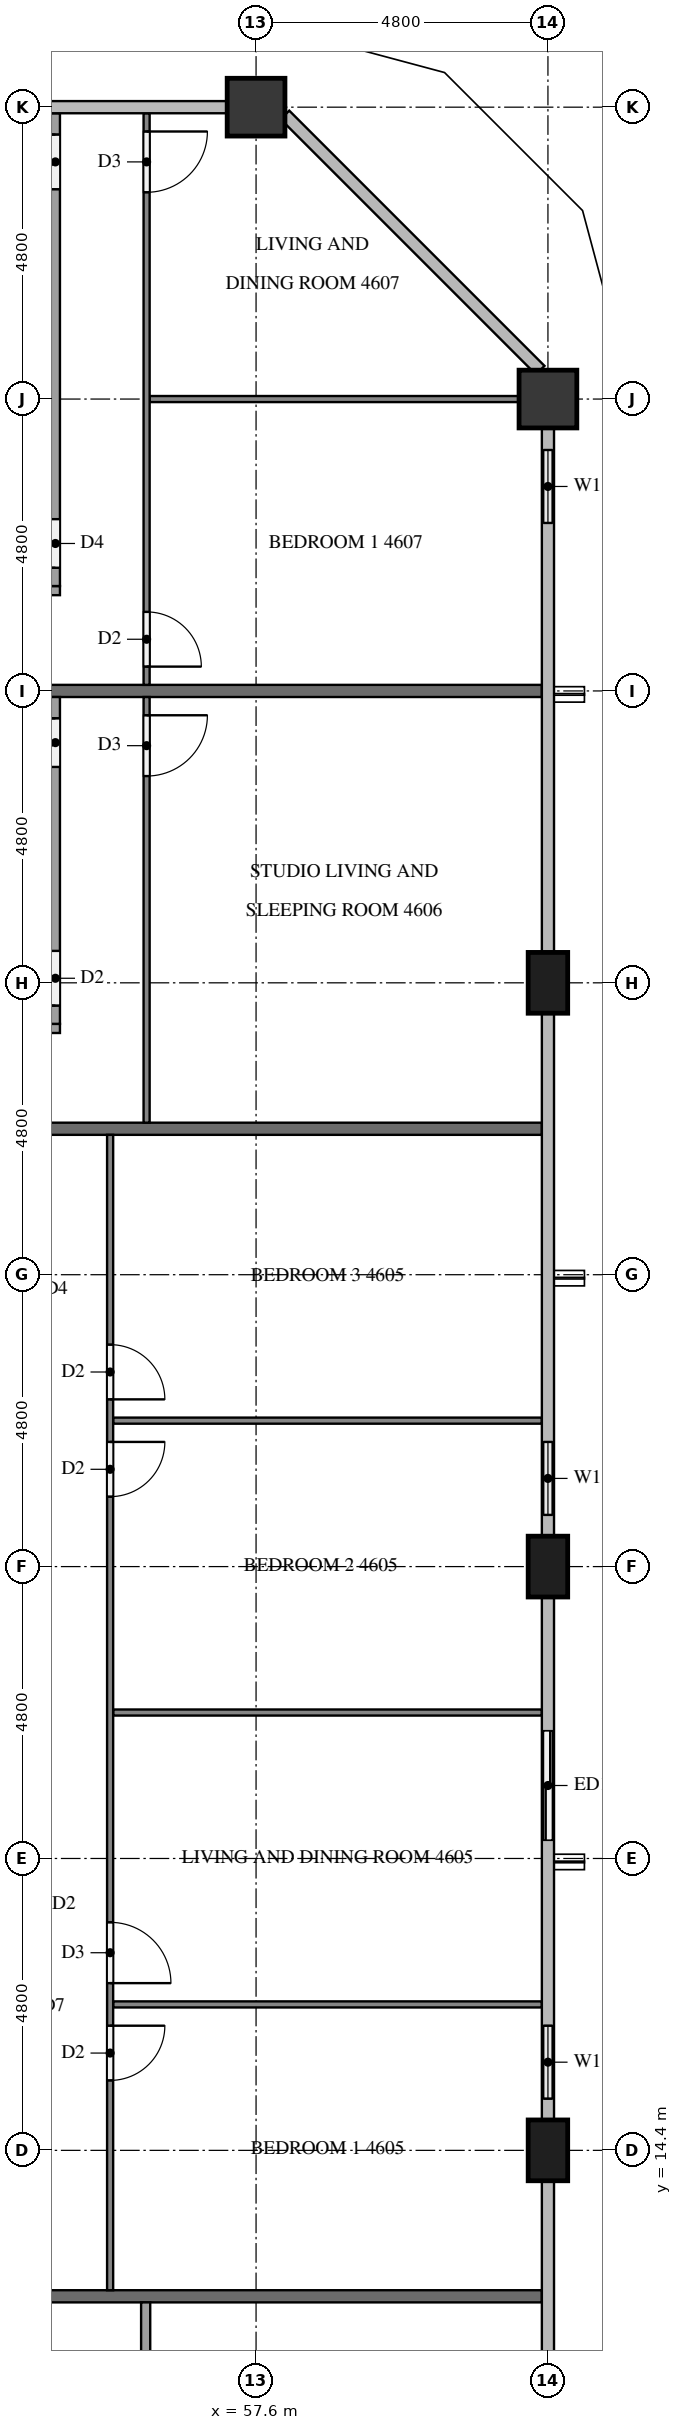
"""IFC4 building model, lengths in metres.
Left out: names, types, materials, properties, quantities, classifications, styles, units other than length and angle.
Written with IfcOpenShell. Run it as: python <this file> out.ifc"""

import sys

from ifc_helpers import new_model, si_unit, direction, frame, frame_2d, origin, origin_2d, place, context, subcontext, project, spatial, rectangle, extrude, element, fill, save


model = new_model("IFC4")
c1 = context("Model", 3, precision=1e-05, world=origin(), true_north=direction((0.0, 1.0)))
c2 = subcontext(c1, "Body", "Model", "MODEL_VIEW")
j1 = project(units=[si_unit("LENGTHUNIT", "METRE"), si_unit("PLANEANGLEUNIT", "RADIAN")], contexts=[c1])
p1 = place(None, origin())
s1 = spatial("IfcSite", under=j1, at=p1, CompositionType="ELEMENT")
p2 = place(p1, origin())
s2 = spatial("IfcBuilding", under=s1, at=p2, CompositionType="ELEMENT")
p3 = place(p2, frame((0.0, 0.0, 178.9)))
s3 = spatial("IfcBuildingStorey", under=s2, at=p3, CompositionType="ELEMENT", Elevation=178.9)
for number, where, z_axis, x_axis in (
    (1, (62.4, 14.4, 0.0), (0.0, 0.0, 1.0), (0.0, 1.0, 0.0)),
    (2, (62.4, 24.0, 0.0), (0.0, 0.0, 1.0), (0.0, 1.0, 0.0)),
    (3, (62.4, 33.6, 0.0), (0.0, 0.0, 1.0), (0.0, 1.0, 0.0)),
):
    element("IfcColumn", number, at=place(p3, frame(where, z_axis=z_axis, x_axis=x_axis)), inside=s3, PredefinedType="COLUMN", context=c2, shape_type="SweptSolid", body=[
        extrude(rectangle(XDim=1.0, YDim=0.65, at=origin_2d()), origin(), (0.0, 0.0, 1.0), 3.2),
    ])
for number, where, z_axis, x_axis in (
    (4, (62.4, 43.2, 0.0), (0.0, 0.0, 1.0), (1.0, 0.0, 0.0)),
    (5, (57.6, 48.0, 0.0), (0.0, 0.0, 1.0), (1.0, 0.0, 0.0)),
):
    element("IfcColumn", number, at=place(p3, frame(where, z_axis=z_axis, x_axis=x_axis)), inside=s3, PredefinedType="COLUMN", context=c2, shape_type="SweptSolid", body=[
        extrude(rectangle(XDim=0.95, YDim=0.95, at=origin_2d()), origin(), (0.0, 0.0, 1.0), 3.2),
    ])
p4 = place(p3, frame((62.4, 14.9, 0.0), z_axis=(0.0, 0.0, 1.0), x_axis=(0.0, 1.0, 0.0)))
e6 = element("IfcWall", 6, at=p4, inside=s3, PredefinedType="SOLIDWALL", context=c2, shape_type="SweptSolid", body=[
    extrude(rectangle(XDim=1.9, YDim=0.15, at=frame_2d((0.95, 0.0))), origin(), (0.0, 0.0, 1.0), 3.2),
])
p5 = place(p4, frame((0.35, 0.0, 0.9)))
e7 = element("IfcOpeningElement", 7, at=p5, cuts=e6, PredefinedType="OPENING", context=c2, shape_type="SweptSolid", body=[
    extrude(rectangle(XDim=1.2, YDim=1.4, at=frame_2d((0.6, 0.7))), frame((0.0, 0.085, 0.0), z_axis=(0.0, -1.0, 0.0), x_axis=(1.0, 0.0, 0.0)), (0.0, 0.0, 1.0), 0.17),
])
p6 = place(p3, frame((62.4, 19.2, 0.0), z_axis=(0.0, 0.0, 1.0), x_axis=(0.0, 1.0, 0.0)))
e8 = element("IfcWall", 8, at=p6, inside=s3, PredefinedType="SOLIDWALL", context=c2, shape_type="SweptSolid", body=[
    extrude(rectangle(XDim=2.4, YDim=0.15, at=frame_2d((1.2, 0.0))), origin(), (0.0, 0.0, 1.0), 3.2),
])
p7 = place(p6, frame((0.3, 0.0, 0.0)))
e9 = element("IfcOpeningElement", 9, at=p7, cuts=e8, PredefinedType="OPENING", context=c2, shape_type="SweptSolid", body=[
    extrude(rectangle(XDim=1.8, YDim=2.4, at=frame_2d((0.9, 1.2))), frame((0.0, 0.085, 0.0), z_axis=(0.0, -1.0, 0.0), x_axis=(1.0, 0.0, 0.0)), (0.0, 0.0, 1.0), 0.17),
])
p8 = place(p3, frame((62.4, 24.5, 0.0), z_axis=(0.0, 0.0, 1.0), x_axis=(0.0, 1.0, 0.0)))
e10 = element("IfcWall", 10, at=p8, inside=s3, PredefinedType="SOLIDWALL", context=c2, shape_type="SweptSolid", body=[
    extrude(rectangle(XDim=1.9, YDim=0.15, at=frame_2d((0.95, 0.0))), origin(), (0.0, 0.0, 1.0), 3.2),
])
p9 = place(p8, frame((0.35, 0.0, 0.9)))
e11 = element("IfcOpeningElement", 11, at=p9, cuts=e10, PredefinedType="OPENING", context=c2, shape_type="SweptSolid", body=[
    extrude(rectangle(XDim=1.2, YDim=1.4, at=frame_2d((0.6, 0.7))), frame((0.0, 0.085, 0.0), z_axis=(0.0, -1.0, 0.0), x_axis=(1.0, 0.0, 0.0)), (0.0, 0.0, 1.0), 0.17),
])
p10 = place(p3, frame((62.4, 40.8, 0.0), z_axis=(0.0, 0.0, 1.0), x_axis=(0.0, 1.0, 0.0)))
e12 = element("IfcWall", 12, at=p10, inside=s3, PredefinedType="SOLIDWALL", context=c2, shape_type="SweptSolid", body=[
    extrude(rectangle(XDim=1.925, YDim=0.15, at=frame_2d((0.962, 0.0))), origin(), (0.0, 0.0, 1.0), 3.2),
])
p11 = place(p10, frame((0.363, 0.0, 0.9)))
e13 = element("IfcOpeningElement", 13, at=p11, cuts=e12, PredefinedType="OPENING", context=c2, shape_type="SweptSolid", body=[
    extrude(rectangle(XDim=1.2, YDim=1.4, at=frame_2d((0.6, 0.7))), frame((0.0, 0.085, 0.0), z_axis=(0.0, -1.0, 0.0), x_axis=(1.0, 0.0, 0.0)), (0.0, 0.0, 1.0), 0.17),
])
for number, where, z_axis, x_axis in (
    (14, (50.5, 12.0, 0.0), (0.0, 0.0, 1.0), (1.0, 0.0, 0.0)),
    (15, (50.5, 31.2, 0.0), (0.0, 0.0, 1.0), (1.0, 0.0, 0.0)),
    (16, (50.5, 38.4, 0.0), (0.0, 0.0, 1.0), (1.0, 0.0, 0.0)),
):
    element("IfcWall", number, at=place(p3, frame(where, z_axis=z_axis, x_axis=x_axis)), inside=s3, PredefinedType="PARTITIONING", context=c2, shape_type="SweptSolid", body=[
        extrude(rectangle(XDim=11.8, YDim=0.2, at=frame_2d((5.9, 0.0))), origin(), (0.0, 0.0, 1.0), 3.2),
    ])
p12 = place(p3, frame((55.784, 11.9, 0.0), z_axis=(0.0, 0.0, 1.0), x_axis=(0.0, -1.0, 0.0)))
e17 = element("IfcWall", 17, at=p12, inside=s3, PredefinedType="PARTITIONING", context=c2, shape_type="SweptSolid", body=[
    extrude(rectangle(XDim=4.325, YDim=0.15, at=frame_2d((2.163, 0.0))), origin(), (0.0, 0.0, 1.0), 3.2),
])
for number, where, z_axis, x_axis in (
    (18, (55.25, 16.8, 0.0), (0.0, 0.0, 1.0), (1.0, 0.0, 0.0)),
    (19, (55.25, 21.6, 0.0), (0.0, 0.0, 1.0), (1.0, 0.0, 0.0)),
    (20, (55.25, 26.4, 0.0), (0.0, 0.0, 1.0), (1.0, 0.0, 0.0)),
):
    element("IfcWall", number, at=place(p3, frame(where, z_axis=z_axis, x_axis=x_axis)), inside=s3, PredefinedType="PARTITIONING", context=c2, shape_type="SweptSolid", body=[
        extrude(rectangle(XDim=7.05, YDim=0.1, at=frame_2d((3.525, 0.0))), origin(), (0.0, 0.0, 1.0), 3.2),
    ])
p13 = place(p3, frame((55.2, 31.1, 0.0), z_axis=(0.0, 0.0, 1.0), x_axis=(0.0, -1.0, 0.0)))
e21 = element("IfcWall", 21, at=p13, inside=s3, PredefinedType="PARTITIONING", context=c2, shape_type="SweptSolid", body=[
    extrude(rectangle(XDim=19.0, YDim=0.1, at=frame_2d((9.5, 0.0))), origin(), (0.0, 0.0, 1.0), 3.2),
])
p14 = place(p13, frame((14.65, 0.0, 0.0)))
e22 = element("IfcOpeningElement", 22, at=p14, cuts=e21, PredefinedType="OPENING", context=c2, shape_type="SweptSolid", body=[
    extrude(rectangle(XDim=0.9, YDim=2.1, at=frame_2d((0.45, 1.05))), frame((0.0, 0.06, 0.0), z_axis=(0.0, -1.0, 0.0), x_axis=(1.0, 0.0, 0.0)), (0.0, 0.0, 1.0), 0.12),
])
p15 = place(p13, frame((12.95, 0.0, 0.0)))
e23 = element("IfcOpeningElement", 23, at=p15, cuts=e21, PredefinedType="OPENING", context=c2, shape_type="SweptSolid", body=[
    extrude(rectangle(XDim=1.0, YDim=2.1, at=frame_2d((0.5, 1.05))), frame((0.0, 0.06, 0.0), z_axis=(0.0, -1.0, 0.0), x_axis=(1.0, 0.0, 0.0)), (0.0, 0.0, 1.0), 0.12),
])
p16 = place(p13, frame((5.05, 0.0, 0.0)))
e24 = element("IfcOpeningElement", 24, at=p16, cuts=e21, PredefinedType="OPENING", context=c2, shape_type="SweptSolid", body=[
    extrude(rectangle(XDim=0.9, YDim=2.1, at=frame_2d((0.45, 1.05))), frame((0.0, 0.06, 0.0), z_axis=(0.0, -1.0, 0.0), x_axis=(1.0, 0.0, 0.0)), (0.0, 0.0, 1.0), 0.12),
])
p17 = place(p13, frame((3.45, 0.0, 0.0)))
e25 = element("IfcOpeningElement", 25, at=p17, cuts=e21, PredefinedType="OPENING", context=c2, shape_type="SweptSolid", body=[
    extrude(rectangle(XDim=0.9, YDim=2.1, at=frame_2d((0.45, 1.05))), frame((0.0, 0.06, 0.0), z_axis=(0.0, -1.0, 0.0), x_axis=(1.0, 0.0, 0.0)), (0.0, 0.0, 1.0), 0.12),
])
p18 = place(p3, frame((55.8, 38.3, 0.0), z_axis=(0.0, 0.0, 1.0), x_axis=(0.0, -1.0, 0.0)))
e26 = element("IfcWall", 26, at=p18, inside=s3, PredefinedType="PARTITIONING", context=c2, shape_type="SweptSolid", body=[
    extrude(rectangle(XDim=7.0, YDim=0.1, at=frame_2d((3.5, 0.0))), origin(), (0.0, 0.0, 1.0), 3.2),
])
p19 = place(p18, frame((0.3, 0.0, 0.0)))
e27 = element("IfcOpeningElement", 27, at=p19, cuts=e26, PredefinedType="OPENING", context=c2, shape_type="SweptSolid", body=[
    extrude(rectangle(XDim=1.0, YDim=2.1, at=frame_2d((0.5, 1.05))), frame((0.0, 0.06, 0.0), z_axis=(0.0, -1.0, 0.0), x_axis=(1.0, 0.0, 0.0)), (0.0, 0.0, 1.0), 0.12),
])
p20 = place(p3, frame((50.5, 32.85, 0.0), z_axis=(0.0, 0.0, 1.0), x_axis=(1.0, 0.0, 0.0)))
e28 = element("IfcWall", 28, at=p20, inside=s3, PredefinedType="PARTITIONING", context=c2, shape_type="SweptSolid", body=[
    extrude(rectangle(XDim=3.875, YDim=0.15, at=frame_2d((1.938, 0.0))), origin(), (0.0, 0.0, 1.0), 3.2),
])
p21 = place(p3, frame((54.3, 32.925, 0.0), z_axis=(0.0, 0.0, 1.0), x_axis=(0.0, 1.0, 0.0)))
e29 = element("IfcWall", 29, at=p21, inside=s3, PredefinedType="PARTITIONING", context=c2, shape_type="SweptSolid", body=[
    extrude(rectangle(XDim=5.375, YDim=0.15, at=frame_2d((2.688, 0.0))), origin(), (0.0, 0.0, 1.0), 3.2),
])
p22 = place(p21, frame((0.3, 0.0, 0.0)))
e30 = element("IfcOpeningElement", 30, at=p22, cuts=e29, PredefinedType="OPENING", context=c2, shape_type="SweptSolid", body=[
    extrude(rectangle(XDim=0.9, YDim=2.1, at=frame_2d((0.45, 1.05))), frame((0.0, 0.085, 0.0), z_axis=(0.0, -1.0, 0.0), x_axis=(1.0, 0.0, 0.0)), (0.0, 0.0, 1.0), 0.17),
])
p23 = place(p21, frame((4.225, 0.0, 0.0)))
e31 = element("IfcOpeningElement", 31, at=p23, cuts=e29, PredefinedType="OPENING", context=c2, shape_type="SweptSolid", body=[
    extrude(rectangle(XDim=0.8, YDim=2.1, at=frame_2d((0.4, 1.05))), frame((0.0, 0.085, 0.0), z_axis=(0.0, -1.0, 0.0), x_axis=(1.0, 0.0, 0.0)), (0.0, 0.0, 1.0), 0.17),
])
p24 = place(p3, frame((55.85, 43.2, 0.0), z_axis=(0.0, 0.0, 1.0), x_axis=(1.0, 0.0, 0.0)))
e32 = element("IfcWall", 32, at=p24, inside=s3, PredefinedType="PARTITIONING", context=c2, shape_type="SweptSolid", body=[
    extrude(rectangle(XDim=6.075, YDim=0.1, at=frame_2d((3.038, 0.0))), origin(), (0.0, 0.0, 1.0), 3.2),
])
p25 = place(p3, frame((55.8, 47.9, 0.0), z_axis=(0.0, 0.0, 1.0), x_axis=(0.0, -1.0, 0.0)))
e33 = element("IfcWall", 33, at=p25, inside=s3, PredefinedType="PARTITIONING", context=c2, shape_type="SweptSolid", body=[
    extrude(rectangle(XDim=9.4, YDim=0.1, at=frame_2d((4.7, 0.0))), origin(), (0.0, 0.0, 1.0), 3.2),
])
p26 = place(p25, frame((8.2, 0.0, 0.0)))
e34 = element("IfcOpeningElement", 34, at=p26, cuts=e33, PredefinedType="OPENING", context=c2, shape_type="SweptSolid", body=[
    extrude(rectangle(XDim=0.9, YDim=2.1, at=frame_2d((0.45, 1.05))), frame((0.0, 0.06, 0.0), z_axis=(0.0, -1.0, 0.0), x_axis=(1.0, 0.0, 0.0)), (0.0, 0.0, 1.0), 0.12),
])
p27 = place(p25, frame((0.3, 0.0, 0.0)))
e35 = element("IfcOpeningElement", 35, at=p27, cuts=e33, PredefinedType="OPENING", context=c2, shape_type="SweptSolid", body=[
    extrude(rectangle(XDim=1.0, YDim=2.1, at=frame_2d((0.5, 1.05))), frame((0.0, 0.06, 0.0), z_axis=(0.0, -1.0, 0.0), x_axis=(1.0, 0.0, 0.0)), (0.0, 0.0, 1.0), 0.12),
])
p28 = place(p3, frame((50.5, 40.05, 0.0), z_axis=(0.0, 0.0, 1.0), x_axis=(1.0, 0.0, 0.0)))
e36 = element("IfcWall", 36, at=p28, inside=s3, PredefinedType="PARTITIONING", context=c2, shape_type="SweptSolid", body=[
    extrude(rectangle(XDim=3.875, YDim=0.15, at=frame_2d((1.938, 0.0))), origin(), (0.0, 0.0, 1.0), 3.2),
])
p29 = place(p3, frame((54.3, 40.125, 0.0), z_axis=(0.0, 0.0, 1.0), x_axis=(0.0, 1.0, 0.0)))
e37 = element("IfcWall", 37, at=p29, inside=s3, PredefinedType="PARTITIONING", context=c2, shape_type="SweptSolid", body=[
    extrude(rectangle(XDim=7.775, YDim=0.15, at=frame_2d((3.887, 0.0))), origin(), (0.0, 0.0, 1.0), 3.2),
])
p30 = place(p29, frame((0.3, 0.0, 0.0)))
e38 = element("IfcOpeningElement", 38, at=p30, cuts=e37, PredefinedType="OPENING", context=c2, shape_type="SweptSolid", body=[
    extrude(rectangle(XDim=0.8, YDim=2.1, at=frame_2d((0.4, 1.05))), frame((0.0, 0.085, 0.0), z_axis=(0.0, -1.0, 0.0), x_axis=(1.0, 0.0, 0.0)), (0.0, 0.0, 1.0), 0.17),
])
p31 = place(p29, frame((6.525, 0.0, 0.0)))
e39 = element("IfcOpeningElement", 39, at=p31, cuts=e37, PredefinedType="OPENING", context=c2, shape_type="SweptSolid", body=[
    extrude(rectangle(XDim=0.9, YDim=2.1, at=frame_2d((0.45, 1.05))), frame((0.0, 0.085, 0.0), z_axis=(0.0, -1.0, 0.0), x_axis=(1.0, 0.0, 0.0)), (0.0, 0.0, 1.0), 0.17),
])
p32 = place(p5, origin())
e40 = element("IfcWindow", 40, at=p32, inside=s3, PartitioningType="SINGLE_PANEL", PredefinedType="WINDOW", context=c2, shape_type="SweptSolid", body=[
    extrude(rectangle(XDim=1.2, YDim=1.4, at=frame_2d((0.6, 0.7))), frame((0.0, 0.03, 0.0), z_axis=(0.0, -1.0, 0.0), x_axis=(1.0, 0.0, 0.0)), (0.0, 0.0, 1.0), 0.06),
])
fill(e7, e40)
p33 = place(p7, origin())
e41 = element("IfcDoor", 41, at=p33, inside=s3, OperationType="SLIDING_TO_RIGHT", PredefinedType="DOOR", context=c2, shape_type="SweptSolid", body=[
    extrude(rectangle(XDim=1.8, YDim=2.4, at=frame_2d((0.9, 1.2))), frame((0.0, 0.025, 0.0), z_axis=(0.0, -1.0, 0.0), x_axis=(1.0, 0.0, 0.0)), (0.0, 0.0, 1.0), 0.05),
])
fill(e9, e41)
p34 = place(p9, origin())
e42 = element("IfcWindow", 42, at=p34, inside=s3, PartitioningType="SINGLE_PANEL", PredefinedType="WINDOW", context=c2, shape_type="SweptSolid", body=[
    extrude(rectangle(XDim=1.2, YDim=1.4, at=frame_2d((0.6, 0.7))), frame((0.0, 0.03, 0.0), z_axis=(0.0, -1.0, 0.0), x_axis=(1.0, 0.0, 0.0)), (0.0, 0.0, 1.0), 0.06),
])
fill(e11, e42)
p35 = place(p11, origin())
e43 = element("IfcWindow", 43, at=p35, inside=s3, PartitioningType="SINGLE_PANEL", PredefinedType="WINDOW", context=c2, shape_type="SweptSolid", body=[
    extrude(rectangle(XDim=1.2, YDim=1.4, at=frame_2d((0.6, 0.7))), frame((0.0, 0.03, 0.0), z_axis=(0.0, -1.0, 0.0), x_axis=(1.0, 0.0, 0.0)), (0.0, 0.0, 1.0), 0.06),
])
fill(e13, e43)
p36 = place(p14, origin())
e44 = element("IfcDoor", 44, at=p36, inside=s3, OperationType="SINGLE_SWING_LEFT", PredefinedType="DOOR", context=c2, shape_type="SweptSolid", body=[
    extrude(rectangle(XDim=0.9, YDim=2.1, at=frame_2d((0.45, 1.05))), frame((0.0, 0.025, 0.0), z_axis=(0.0, -1.0, 0.0), x_axis=(1.0, 0.0, 0.0)), (0.0, 0.0, 1.0), 0.05),
])
fill(e22, e44)
p37 = place(p15, origin())
e45 = element("IfcDoor", 45, at=p37, inside=s3, OperationType="SINGLE_SWING_RIGHT", PredefinedType="DOOR", context=c2, shape_type="SweptSolid", body=[
    extrude(rectangle(XDim=1.0, YDim=2.1, at=frame_2d((0.5, 1.05))), frame((0.0, 0.025, 0.0), z_axis=(0.0, -1.0, 0.0), x_axis=(1.0, 0.0, 0.0)), (0.0, 0.0, 1.0), 0.05),
])
fill(e23, e45)
p38 = place(p16, origin())
e46 = element("IfcDoor", 46, at=p38, inside=s3, OperationType="SINGLE_SWING_LEFT", PredefinedType="DOOR", context=c2, shape_type="SweptSolid", body=[
    extrude(rectangle(XDim=0.9, YDim=2.1, at=frame_2d((0.45, 1.05))), frame((0.0, 0.025, 0.0), z_axis=(0.0, -1.0, 0.0), x_axis=(1.0, 0.0, 0.0)), (0.0, 0.0, 1.0), 0.05),
])
fill(e24, e46)
p39 = place(p17, origin())
e47 = element("IfcDoor", 47, at=p39, inside=s3, OperationType="SINGLE_SWING_RIGHT", PredefinedType="DOOR", context=c2, shape_type="SweptSolid", body=[
    extrude(rectangle(XDim=0.9, YDim=2.1, at=frame_2d((0.45, 1.05))), frame((0.0, 0.025, 0.0), z_axis=(0.0, -1.0, 0.0), x_axis=(1.0, 0.0, 0.0)), (0.0, 0.0, 1.0), 0.05),
])
fill(e25, e47)
p40 = place(p19, origin())
e48 = element("IfcDoor", 48, at=p40, inside=s3, OperationType="SINGLE_SWING_LEFT", PredefinedType="DOOR", context=c2, shape_type="SweptSolid", body=[
    extrude(rectangle(XDim=1.0, YDim=2.1, at=frame_2d((0.5, 1.05))), frame((0.0, 0.025, 0.0), z_axis=(0.0, -1.0, 0.0), x_axis=(1.0, 0.0, 0.0)), (0.0, 0.0, 1.0), 0.05),
])
fill(e27, e48)
p41 = place(p22, origin())
e49 = element("IfcDoor", 49, at=p41, inside=s3, OperationType="SINGLE_SWING_LEFT", PredefinedType="DOOR", context=c2, shape_type="SweptSolid", body=[
    extrude(rectangle(XDim=0.9, YDim=2.1, at=frame_2d((0.45, 1.05))), frame((0.0, 0.025, 0.0), z_axis=(0.0, -1.0, 0.0), x_axis=(1.0, 0.0, 0.0)), (0.0, 0.0, 1.0), 0.05),
])
fill(e30, e49)
p42 = place(p23, origin())
e50 = element("IfcDoor", 50, at=p42, inside=s3, OperationType="SINGLE_SWING_RIGHT", PredefinedType="DOOR", context=c2, shape_type="SweptSolid", body=[
    extrude(rectangle(XDim=0.8, YDim=2.1, at=frame_2d((0.4, 1.05))), frame((0.0, 0.025, 0.0), z_axis=(0.0, -1.0, 0.0), x_axis=(1.0, 0.0, 0.0)), (0.0, 0.0, 1.0), 0.05),
])
fill(e31, e50)
p43 = place(p26, origin())
e51 = element("IfcDoor", 51, at=p43, inside=s3, OperationType="SINGLE_SWING_RIGHT", PredefinedType="DOOR", context=c2, shape_type="SweptSolid", body=[
    extrude(rectangle(XDim=0.9, YDim=2.1, at=frame_2d((0.45, 1.05))), frame((0.0, 0.025, 0.0), z_axis=(0.0, -1.0, 0.0), x_axis=(1.0, 0.0, 0.0)), (0.0, 0.0, 1.0), 0.05),
])
fill(e34, e51)
p44 = place(p27, origin())
e52 = element("IfcDoor", 52, at=p44, inside=s3, OperationType="SINGLE_SWING_LEFT", PredefinedType="DOOR", context=c2, shape_type="SweptSolid", body=[
    extrude(rectangle(XDim=1.0, YDim=2.1, at=frame_2d((0.5, 1.05))), frame((0.0, 0.025, 0.0), z_axis=(0.0, -1.0, 0.0), x_axis=(1.0, 0.0, 0.0)), (0.0, 0.0, 1.0), 0.05),
])
fill(e35, e52)
p45 = place(p30, origin())
e53 = element("IfcDoor", 53, at=p45, inside=s3, OperationType="SINGLE_SWING_LEFT", PredefinedType="DOOR", context=c2, shape_type="SweptSolid", body=[
    extrude(rectangle(XDim=0.8, YDim=2.1, at=frame_2d((0.4, 1.05))), frame((0.0, 0.025, 0.0), z_axis=(0.0, -1.0, 0.0), x_axis=(1.0, 0.0, 0.0)), (0.0, 0.0, 1.0), 0.05),
])
fill(e38, e53)
p46 = place(p31, origin())
e54 = element("IfcDoor", 54, at=p46, inside=s3, OperationType="SINGLE_SWING_RIGHT", PredefinedType="DOOR", context=c2, shape_type="SweptSolid", body=[
    extrude(rectangle(XDim=0.9, YDim=2.1, at=frame_2d((0.45, 1.05))), frame((0.0, 0.025, 0.0), z_axis=(0.0, -1.0, 0.0), x_axis=(1.0, 0.0, 0.0)), (0.0, 0.0, 1.0), 0.05),
])
fill(e39, e54)
save(model, sys.argv[1])
